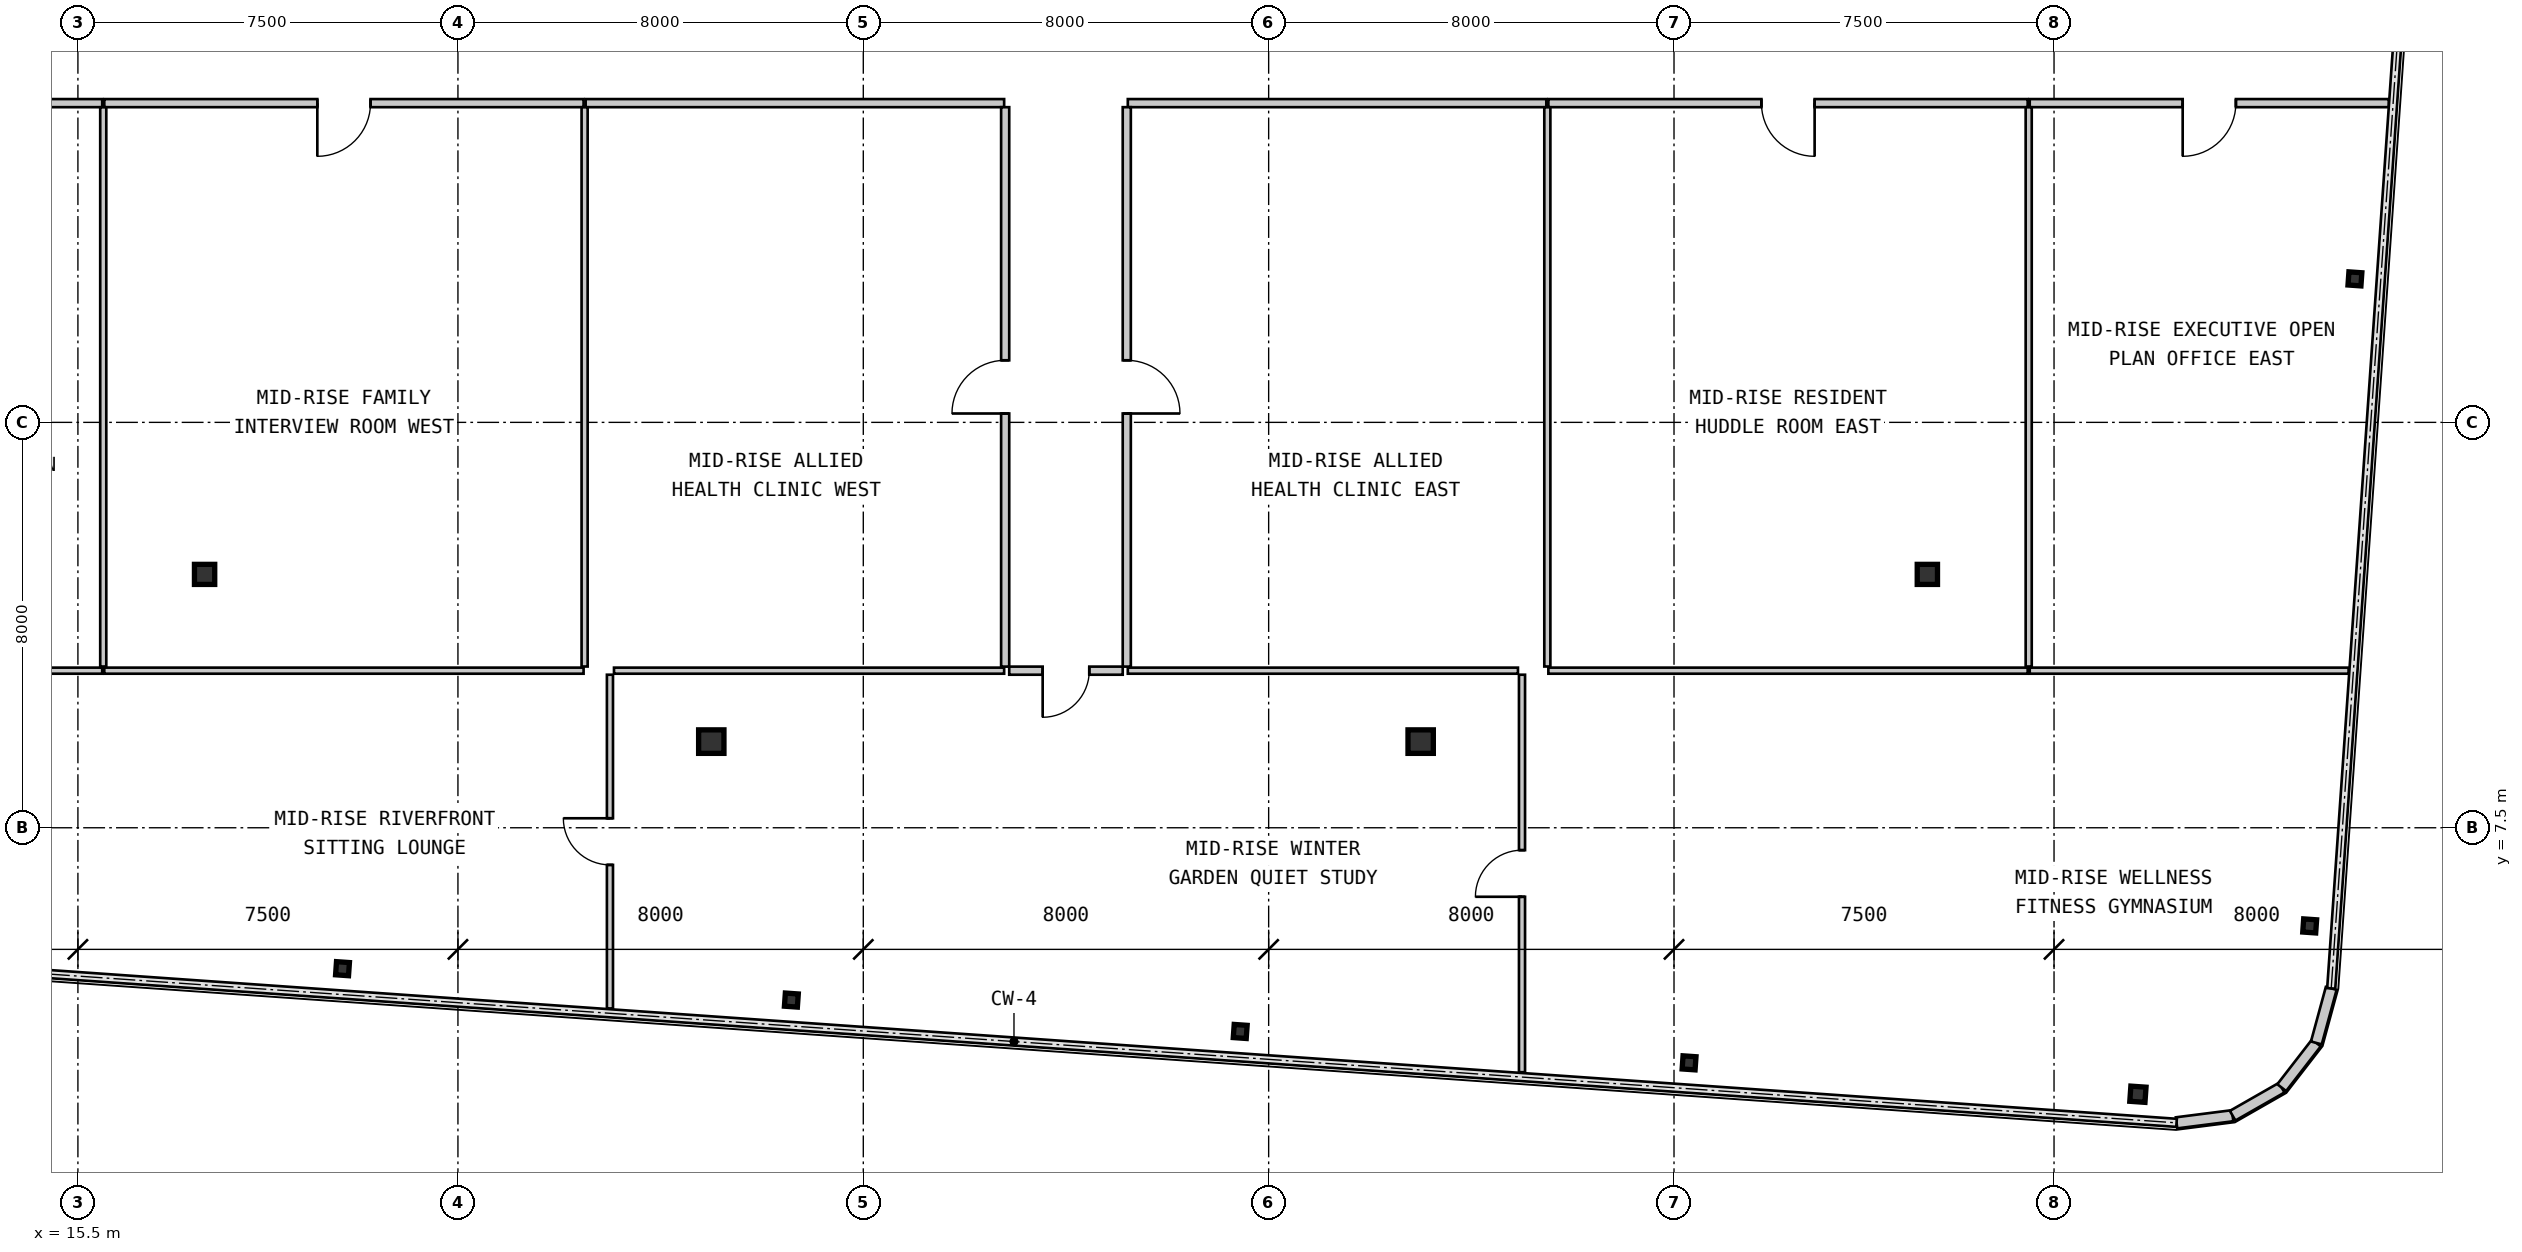
"""IFC4 building model, lengths in metres.
Left out: names, types, materials, properties, quantities, classifications, styles, units other than length and angle.
Written with IfcOpenShell. Run it as: python <this file> out.ifc"""

import sys

from ifc_helpers import new_model, si_unit, direction, frame, frame_2d, origin, origin_2d, place, context, subcontext, project, spatial, rectangle, hollow_rectangle, i_section, extrude, source, transform, mapped, element, fill, save


model = new_model("IFC4")
c1 = context("Model", 3, precision=1e-05, world=origin(), true_north=direction((0.0, 1.0)))
c2 = subcontext(c1, "Body", "Model", "MODEL_VIEW")
j1 = project(units=[si_unit("LENGTHUNIT", "METRE"), si_unit("PLANEANGLEUNIT", "RADIAN")], contexts=[c1])
p1 = place(None, origin())
s1 = spatial("IfcSite", under=j1, at=p1, CompositionType="ELEMENT")
p2 = place(p1, origin())
s2 = spatial("IfcBuilding", under=s1, at=p2, CompositionType="ELEMENT")
p3 = place(p2, frame((0.0, 0.0, 126.7)))
s3 = spatial("IfcBuildingStorey", under=s2, at=p3, CompositionType="ELEMENT", Elevation=126.7)
m1 = source(origin(), c2, "Body", "SweptSolid", [
    extrude(i_section(OverallWidth=0.5, OverallDepth=0.464, WebThickness=0.022, FlangeThickness=0.034, at=origin_2d()), origin(), (0.0, 0.0, 1.0), 3.15),
])
for number, where, z_axis, x_axis in (
    (1, (28.0, 9.2, 0.0), (0.0, 0.0, 1.0), (1.0, 0.0, 0.0)),
    (2, (42.0, 9.2, 0.0), (0.0, 0.0, 1.0), (1.0, 0.0, 0.0)),
):
    element("IfcColumn", number, at=place(p3, frame(where, z_axis=z_axis, x_axis=x_axis)), inside=s3, PredefinedType="COLUMN", context=c2, shape_type="MappedRepresentation", body=[
        mapped(m1, transform((0.0, 0.0, 0.0), scale=1.0)),
    ])
m2 = source(origin(), c2, "Body", "SweptSolid", [
    extrude(i_section(OverallWidth=0.4, OverallDepth=0.396, WebThickness=0.022, FlangeThickness=0.034, at=origin_2d()), origin(), (0.0, 0.0, 1.0), 3.15),
])
for number, where, z_axis, x_axis in (
    (3, (18.0, 12.5, 0.0), (0.0, 0.0, 1.0), (1.0, 0.0, 0.0)),
    (4, (52.0, 12.5, 0.0), (0.0, 0.0, 1.0), (1.0, 0.0, 0.0)),
):
    element("IfcColumn", number, at=place(p3, frame(where, z_axis=z_axis, x_axis=x_axis)), inside=s3, PredefinedType="COLUMN", context=c2, shape_type="MappedRepresentation", body=[
        mapped(m2, transform((0.0, 0.0, 0.0), scale=1.0)),
    ])
m3 = source(origin(), c2, "Body", "SweptSolid", [
    extrude(i_section(OverallWidth=0.256, OverallDepth=0.26, WebThickness=0.01, FlangeThickness=0.017, at=origin_2d()), origin(), (0.0, 0.0, 1.0), 3.15),
])
for number, where, z_axis, x_axis in (
    (5, (20.722, 4.719, 0.0), (0.0, 0.0, 1.0), (0.998, -0.07, 0.0)),
    (6, (29.58, 4.1, 0.0), (0.0, 0.0, 1.0), (0.998, -0.07, 0.0)),
    (7, (38.439, 3.48, 0.0), (0.0, 0.0, 1.0), (0.998, -0.07, 0.0)),
    (8, (47.297, 2.861, 0.0), (0.0, 0.0, 1.0), (0.998, -0.07, 0.0)),
):
    element("IfcColumn", number, at=place(p3, frame(where, z_axis=z_axis, x_axis=x_axis)), inside=s3, PredefinedType="COLUMN", context=c2, shape_type="MappedRepresentation", body=[
        mapped(m3, transform((0.0, 0.0, 0.0), scale=1.0)),
    ])
m4 = source(origin(), c2, "Body", "SweptSolid", [
    extrude(hollow_rectangle(XDim=0.3, YDim=0.3, WallThickness=0.012, at=origin_2d()), origin(), (0.0, 0.0, 1.0), 3.15),
])
p4 = place(p3, frame((56.156, 2.241, 0.0), z_axis=(0.0, 0.0, 1.0), x_axis=(0.99756405026, -0.069756473744, 0.0)))
e9 = element("IfcColumn", 9, at=p4, inside=s3, PredefinedType="COLUMN", context=c2, shape_type="MappedRepresentation", body=[
    mapped(m4, transform((0.0, 0.0, 0.0), scale=1.0)),
])
for number, where, z_axis, x_axis in (
    (10, (59.545, 5.563, 0.0), (0.0, 0.0, 1.0), (0.998, -0.07, 0.0)),
    (11, (60.438, 18.332, 0.0), (0.0, 0.0, 1.0), (0.998, -0.07, 0.0)),
):
    element("IfcColumn", number, at=place(p3, frame(where, z_axis=z_axis, x_axis=x_axis)), inside=s3, PredefinedType="COLUMN", context=c2, shape_type="MappedRepresentation", body=[
        mapped(m3, transform((0.0, 0.0, 0.0), scale=1.0)),
    ])
m5 = source(origin(), c2, "Body", "SweptSolid", [
    extrude(rectangle(XDim=1.116, YDim=0.22, at=frame_2d((0.558, 0.0))), origin(), (0.0, 0.0, 1.0), 2.93),
])
p5 = place(p3, frame((56.918, 1.677, 0.0), z_axis=(0.0, 0.0, 1.0), x_axis=(0.99202678349, 0.126027222605, 0.0)))
e12 = element("IfcWall", 12, at=p5, inside=s3, PredefinedType="SOLIDWALL", context=c2, shape_type="MappedRepresentation", body=[
    mapped(m5, transform((0.0, 0.0, 0.0), scale=1.0)),
])
m6 = source(origin(), c2, "Body", "SweptSolid", [
    extrude(rectangle(XDim=1.116, YDim=0.22, at=frame_2d((0.558, 0.0))), origin(), (0.0, 0.0, 1.0), 2.93),
])
for number, where, z_axis, x_axis in (
    (13, (58.025, 1.817, 0.0), (0.0, 0.0, 1.0), (0.868, 0.496, 0.0)),
    (14, (58.994, 2.371, 0.0), (0.0, 0.0, 1.0), (0.612, 0.791, 0.0)),
    (15, (59.677, 3.254, 0.0), (0.0, 0.0, 1.0), (0.263, 0.965, 0.0)),
):
    element("IfcWall", number, at=place(p3, frame(where, z_axis=z_axis, x_axis=x_axis)), inside=s3, PredefinedType="SOLIDWALL", context=c2, shape_type="MappedRepresentation", body=[
        mapped(m6, transform((0.0, 0.0, 0.0), scale=1.0)),
    ])
m7 = source(origin(), c2, "Body", "SweptSolid", [
    extrude(rectangle(XDim=6.538, YDim=0.16, at=frame_2d((3.269, 0.0))), origin(), (0.0, 0.0, 1.0), 2.93),
])
p6 = place(p3, frame((15.98, 21.8, 0.0), z_axis=(0.0, 0.0, 1.0), x_axis=(-1.0, 0.0, 0.0)))
e16 = element("IfcWall", 16, at=p6, inside=s3, PredefinedType="PARTITIONING", context=c2, shape_type="MappedRepresentation", body=[
    mapped(m7, transform((0.0, 0.0, 0.0), scale=1.0)),
])
m8 = source(origin(), c2, "Body", "SweptSolid", [
    extrude(rectangle(XDim=1.05, YDim=2.1, at=frame_2d((0.525, 1.05))), frame((0.0, 0.09, 0.0), z_axis=(0.0, -1.0, 0.0), x_axis=(1.0, 0.0, 0.0)), (0.0, 0.0, 1.0), 0.18),
])
p7 = place(p6, frame((2.744, 0.0, 0.0)))
e17 = element("IfcOpeningElement", 17, at=p7, cuts=e16, PredefinedType="OPENING", context=c2, shape_type="MappedRepresentation", body=[
    mapped(m8, transform((0.0, 0.0, 0.0), scale=1.0)),
])
m9 = source(origin(), c2, "Body", "SweptSolid", [
    extrude(rectangle(XDim=9.459, YDim=0.16, at=frame_2d((4.73, 0.0))), origin(), (0.0, 0.0, 1.0), 2.93),
])
p8 = place(p3, frame((25.48, 21.8, 0.0), z_axis=(0.0, 0.0, 1.0), x_axis=(-1.0, 0.0, 0.0)))
e18 = element("IfcWall", 18, at=p8, inside=s3, PredefinedType="PARTITIONING", context=c2, shape_type="MappedRepresentation", body=[
    mapped(m9, transform((0.0, 0.0, 0.0), scale=1.0)),
])
p9 = place(p8, frame((4.205, 0.0, 0.0)))
e19 = element("IfcOpeningElement", 19, at=p9, cuts=e18, PredefinedType="OPENING", context=c2, shape_type="MappedRepresentation", body=[
    mapped(m8, transform((0.0, 0.0, 0.0), scale=1.0)),
])
m10 = source(origin(), c2, "Body", "SweptSolid", [
    extrude(rectangle(XDim=8.26, YDim=0.16, at=frame_2d((4.13, 0.0))), origin(), (0.0, 0.0, 1.0), 2.93),
])
for number, where, z_axis, x_axis in (
    (20, (33.78, 21.8, 0.0), (0.0, 0.0, 1.0), (-1.0, 0.0, 0.0)),
    (21, (44.48, 21.8, 0.0), (0.0, 0.0, 1.0), (-1.0, 0.0, 0.0)),
):
    element("IfcWall", number, at=place(p3, frame(where, z_axis=z_axis, x_axis=x_axis)), inside=s3, PredefinedType="PARTITIONING", context=c2, shape_type="MappedRepresentation", body=[
        mapped(m10, transform((0.0, 0.0, 0.0), scale=1.0)),
    ])
p10 = place(p3, frame((53.98, 21.8, 0.0), z_axis=(0.0, 0.0, 1.0), x_axis=(-1.0, 0.0, 0.0)))
e22 = element("IfcWall", 22, at=p10, inside=s3, PredefinedType="PARTITIONING", context=c2, shape_type="MappedRepresentation", body=[
    mapped(m9, transform((0.0, 0.0, 0.0), scale=1.0)),
])
p11 = place(p10, frame((4.205, 0.0, 0.0)))
e23 = element("IfcOpeningElement", 23, at=p11, cuts=e22, PredefinedType="OPENING", context=c2, shape_type="MappedRepresentation", body=[
    mapped(m8, transform((0.0, 0.0, 0.0), scale=1.0)),
])
m11 = source(origin(), c2, "Body", "SweptSolid", [
    extrude(rectangle(XDim=7.087, YDim=0.16, at=frame_2d((3.543, 0.0))), origin(), (0.0, 0.0, 1.0), 2.93),
])
p12 = place(p3, frame((61.107, 21.8, 0.0), z_axis=(0.0, 0.0, 1.0), x_axis=(-1.0, 0.0, 0.0)))
e24 = element("IfcWall", 24, at=p12, inside=s3, PredefinedType="PARTITIONING", context=c2, shape_type="MappedRepresentation", body=[
    mapped(m11, transform((0.0, 0.0, 0.0), scale=1.0)),
])
p13 = place(p12, frame((3.019, 0.0, 0.0)))
e25 = element("IfcOpeningElement", 25, at=p13, cuts=e24, PredefinedType="OPENING", context=c2, shape_type="MappedRepresentation", body=[
    mapped(m8, transform((0.0, 0.0, 0.0), scale=1.0)),
])
m12 = source(origin(), c2, "Body", "SweptSolid", [
    extrude(rectangle(XDim=2.24, YDim=0.16, at=frame_2d((1.12, 0.0))), origin(), (0.0, 0.0, 1.0), 2.93),
])
p14 = place(p3, frame((36.12, 10.6, 0.0), z_axis=(0.0, 0.0, 1.0), x_axis=(-1.0, 0.0, 0.0)))
e26 = element("IfcWall", 26, at=p14, inside=s3, PredefinedType="PARTITIONING", context=c2, shape_type="MappedRepresentation", body=[
    mapped(m12, transform((0.0, 0.0, 0.0), scale=1.0)),
])
m13 = source(origin(), c2, "Body", "SweptSolid", [
    extrude(rectangle(XDim=0.92, YDim=2.1, at=frame_2d((0.46, 1.05))), frame((0.0, 0.09, 0.0), z_axis=(0.0, -1.0, 0.0), x_axis=(1.0, 0.0, 0.0)), (0.0, 0.0, 1.0), 0.18),
])
p15 = place(p14, frame((0.66, 0.0, 0.0)))
e27 = element("IfcOpeningElement", 27, at=p15, cuts=e26, PredefinedType="OPENING", context=c2, shape_type="MappedRepresentation", body=[
    mapped(m13, transform((0.0, 0.0, 0.0), scale=1.0)),
])
m14 = source(origin(), c2, "Body", "SweptSolid", [
    extrude(rectangle(XDim=11.04, YDim=0.16, at=frame_2d((5.52, 0.0))), origin(), (0.0, 0.0, 1.0), 2.93),
])
p16 = place(p3, frame((33.8, 10.68, 0.0), z_axis=(0.0, 0.0, 1.0), x_axis=(0.0, 1.0, 0.0)))
e28 = element("IfcWall", 28, at=p16, inside=s3, PredefinedType="PARTITIONING", context=c2, shape_type="MappedRepresentation", body=[
    mapped(m14, transform((0.0, 0.0, 0.0), scale=1.0)),
])
p17 = place(p16, frame((4.995, 0.0, 0.0)))
e29 = element("IfcOpeningElement", 29, at=p17, cuts=e28, PredefinedType="OPENING", context=c2, shape_type="MappedRepresentation", body=[
    mapped(m8, transform((0.0, 0.0, 0.0), scale=1.0)),
])
p18 = place(p3, frame((36.2, 21.72, 0.0), z_axis=(0.0, 0.0, 1.0), x_axis=(0.0, -1.0, 0.0)))
e30 = element("IfcWall", 30, at=p18, inside=s3, PredefinedType="PARTITIONING", context=c2, shape_type="MappedRepresentation", body=[
    mapped(m14, transform((0.0, 0.0, 0.0), scale=1.0)),
])
p19 = place(p18, frame((4.995, 0.0, 0.0)))
e31 = element("IfcOpeningElement", 31, at=p19, cuts=e30, PredefinedType="OPENING", context=c2, shape_type="MappedRepresentation", body=[
    mapped(m8, transform((0.0, 0.0, 0.0), scale=1.0)),
])
m15 = source(origin(), c2, "Body", "SweptSolid", [
    extrude(rectangle(XDim=6.585, YDim=0.12, at=frame_2d((3.293, 0.0))), origin(), (0.0, 0.0, 1.0), 2.93),
])
p20 = place(p3, frame((26.0, 10.52, 0.0), z_axis=(0.0, 0.0, 1.0), x_axis=(0.0, -1.0, 0.0)))
e32 = element("IfcWall", 32, at=p20, inside=s3, PredefinedType="PARTITIONING", context=c2, shape_type="MappedRepresentation", body=[
    mapped(m15, transform((0.0, 0.0, 0.0), scale=1.0)),
])
m16 = source(origin(), c2, "Body", "SweptSolid", [
    extrude(rectangle(XDim=0.92, YDim=2.1, at=frame_2d((0.46, 1.05))), frame((0.0, 0.07, 0.0), z_axis=(0.0, -1.0, 0.0), x_axis=(1.0, 0.0, 0.0)), (0.0, 0.0, 1.0), 0.14),
])
p21 = place(p20, frame((2.833, 0.0, 0.0)))
e33 = element("IfcOpeningElement", 33, at=p21, cuts=e32, PredefinedType="OPENING", context=c2, shape_type="MappedRepresentation", body=[
    mapped(m16, transform((0.0, 0.0, 0.0), scale=1.0)),
])
m17 = source(origin(), c2, "Body", "SweptSolid", [
    extrude(rectangle(XDim=7.333, YDim=0.12, at=frame_2d((3.666, 0.0))), origin(), (0.0, 0.0, 1.0), 2.93),
])
p22 = place(p3, frame((8.647, 10.6, 0.0), z_axis=(0.0, 0.0, 1.0), x_axis=(1.0, 0.0, 0.0)))
e34 = element("IfcWall", 34, at=p22, inside=s3, PredefinedType="PARTITIONING", context=c2, shape_type="MappedRepresentation", body=[
    mapped(m17, transform((0.0, 0.0, 0.0), scale=1.0)),
])
m18 = source(origin(), c2, "Body", "SweptSolid", [
    extrude(rectangle(XDim=9.459, YDim=0.12, at=frame_2d((4.73, 0.0))), origin(), (0.0, 0.0, 1.0), 2.93),
])
p23 = place(p3, frame((16.02, 10.6, 0.0), z_axis=(0.0, 0.0, 1.0), x_axis=(1.0, 0.0, 0.0)))
e35 = element("IfcWall", 35, at=p23, inside=s3, PredefinedType="PARTITIONING", context=c2, shape_type="MappedRepresentation", body=[
    mapped(m18, transform((0.0, 0.0, 0.0), scale=1.0)),
])
m19 = source(origin(), c2, "Body", "SweptSolid", [
    extrude(rectangle(XDim=7.844, YDim=0.12, at=frame_2d((3.922, 0.0))), origin(), (0.0, 0.0, 1.0), 2.93),
])
p24 = place(p3, frame((44.0, 10.52, 0.0), z_axis=(0.0, 0.0, 1.0), x_axis=(0.0, -1.0, 0.0)))
e36 = element("IfcWall", 36, at=p24, inside=s3, PredefinedType="PARTITIONING", context=c2, shape_type="MappedRepresentation", body=[
    mapped(m19, transform((0.0, 0.0, 0.0), scale=1.0)),
])
p25 = place(p24, frame((3.462, 0.0, 0.0)))
e37 = element("IfcOpeningElement", 37, at=p25, cuts=e36, PredefinedType="OPENING", context=c2, shape_type="MappedRepresentation", body=[
    mapped(m16, transform((0.0, 0.0, 0.0), scale=1.0)),
])
m20 = source(origin(), c2, "Body", "SweptSolid", [
    extrude(rectangle(XDim=7.7, YDim=0.12, at=frame_2d((3.85, 0.0))), origin(), (0.0, 0.0, 1.0), 2.93),
])
for number, where, z_axis, x_axis in (
    (38, (26.08, 10.6, 0.0), (0.0, 0.0, 1.0), (1.0, 0.0, 0.0)),
    (39, (36.22, 10.6, 0.0), (0.0, 0.0, 1.0), (1.0, 0.0, 0.0)),
):
    element("IfcWall", number, at=place(p3, frame(where, z_axis=z_axis, x_axis=x_axis)), inside=s3, PredefinedType="PARTITIONING", context=c2, shape_type="MappedRepresentation", body=[
        mapped(m20, transform((0.0, 0.0, 0.0), scale=1.0)),
    ])
p26 = place(p3, frame((44.52, 10.6, 0.0), z_axis=(0.0, 0.0, 1.0), x_axis=(1.0, 0.0, 0.0)))
e40 = element("IfcWall", 40, at=p26, inside=s3, PredefinedType="PARTITIONING", context=c2, shape_type="MappedRepresentation", body=[
    mapped(m18, transform((0.0, 0.0, 0.0), scale=1.0)),
])
m21 = source(origin(), c2, "Body", "SweptSolid", [
    extrude(rectangle(XDim=6.293, YDim=0.12, at=frame_2d((3.146, 0.0))), origin(), (0.0, 0.0, 1.0), 2.93),
])
p27 = place(p3, frame((54.02, 10.6, 0.0), z_axis=(0.0, 0.0, 1.0), x_axis=(1.0, 0.0, 0.0)))
e41 = element("IfcWall", 41, at=p27, inside=s3, PredefinedType="PARTITIONING", context=c2, shape_type="MappedRepresentation", body=[
    mapped(m21, transform((0.0, 0.0, 0.0), scale=1.0)),
])
m22 = source(origin(), c2, "Body", "SweptSolid", [
    extrude(rectangle(XDim=11.036, YDim=0.12, at=frame_2d((5.518, 0.0))), origin(), (0.0, 0.0, 1.0), 2.93),
])
for number, where, z_axis, x_axis in (
    (42, (16.0, 21.718, 0.0), (0.0, 0.0, 1.0), (0.0, -1.0, 0.0)),
    (43, (25.5, 21.718, 0.0), (0.0, 0.0, 1.0), (0.0, -1.0, 0.0)),
    (44, (44.5, 21.718, 0.0), (0.0, 0.0, 1.0), (0.0, -1.0, 0.0)),
    (45, (54.0, 21.718, 0.0), (0.0, 0.0, 1.0), (0.0, -1.0, 0.0)),
):
    element("IfcWall", number, at=place(p3, frame(where, z_axis=z_axis, x_axis=x_axis)), inside=s3, PredefinedType="PARTITIONING", context=c2, shape_type="MappedRepresentation", body=[
        mapped(m22, transform((0.0, 0.0, 0.0), scale=1.0)),
    ])
m23 = source(origin(), c2, "Body", "SweptSolid", [
    extrude(rectangle(XDim=1.05, YDim=2.1, at=frame_2d((0.525, 1.05))), frame((0.0, 0.025, 0.0), z_axis=(0.0, -1.0, 0.0), x_axis=(1.0, 0.0, 0.0)), (0.0, 0.0, 1.0), 0.05),
])
p28 = place(p9, origin())
e46 = element("IfcDoor", 46, at=p28, inside=s3, OperationType="SINGLE_SWING_RIGHT", PredefinedType="DOOR", context=c2, shape_type="MappedRepresentation", body=[
    mapped(m23, transform((0.0, 0.0, 0.0), scale=1.0)),
])
fill(e19, e46)
p29 = place(p11, origin())
e47 = element("IfcDoor", 47, at=p29, inside=s3, OperationType="SINGLE_SWING_LEFT", PredefinedType="DOOR", context=c2, shape_type="MappedRepresentation", body=[
    mapped(m23, transform((0.0, 0.0, 0.0), scale=1.0)),
])
fill(e23, e47)
p30 = place(p13, origin())
e48 = element("IfcDoor", 48, at=p30, inside=s3, OperationType="SINGLE_SWING_RIGHT", PredefinedType="DOOR", context=c2, shape_type="MappedRepresentation", body=[
    mapped(m23, transform((0.0, 0.0, 0.0), scale=1.0)),
])
fill(e25, e48)
m24 = source(origin(), c2, "Body", "SweptSolid", [
    extrude(rectangle(XDim=0.92, YDim=2.1, at=frame_2d((0.46, 1.05))), frame((0.0, 0.025, 0.0), z_axis=(0.0, -1.0, 0.0), x_axis=(1.0, 0.0, 0.0)), (0.0, 0.0, 1.0), 0.05),
])
p31 = place(p15, origin())
e49 = element("IfcDoor", 49, at=p31, inside=s3, OperationType="SINGLE_SWING_RIGHT", PredefinedType="DOOR", context=c2, shape_type="MappedRepresentation", body=[
    mapped(m24, transform((0.0, 0.0, 0.0), scale=1.0)),
])
fill(e27, e49)
p32 = place(p17, origin())
e50 = element("IfcDoor", 50, at=p32, inside=s3, OperationType="SINGLE_SWING_LEFT", PredefinedType="DOOR", context=c2, shape_type="MappedRepresentation", body=[
    mapped(m23, transform((0.0, 0.0, 0.0), scale=1.0)),
])
fill(e29, e50)
p33 = place(p19, origin())
e51 = element("IfcDoor", 51, at=p33, inside=s3, OperationType="SINGLE_SWING_RIGHT", PredefinedType="DOOR", context=c2, shape_type="MappedRepresentation", body=[
    mapped(m23, transform((0.0, 0.0, 0.0), scale=1.0)),
])
fill(e31, e51)
p34 = place(p21, frame((0.92, 0.0, 0.0), z_axis=(0.0, 0.0, 1.0), x_axis=(-1.0, 0.0, 0.0)))
e52 = element("IfcDoor", 52, at=p34, inside=s3, OperationType="SINGLE_SWING_RIGHT", PredefinedType="DOOR", context=c2, shape_type="MappedRepresentation", body=[
    mapped(m24, transform((0.0, 0.0, 0.0), scale=1.0)),
])
fill(e33, e52)
p35 = place(p25, frame((0.92, 0.0, 0.0), z_axis=(0.0, 0.0, 1.0), x_axis=(-1.0, 0.0, 0.0)))
e53 = element("IfcDoor", 53, at=p35, inside=s3, OperationType="SINGLE_SWING_LEFT", PredefinedType="DOOR", context=c2, shape_type="MappedRepresentation", body=[
    mapped(m24, transform((0.0, 0.0, 0.0), scale=1.0)),
])
fill(e37, e53)
save(model, sys.argv[1])
